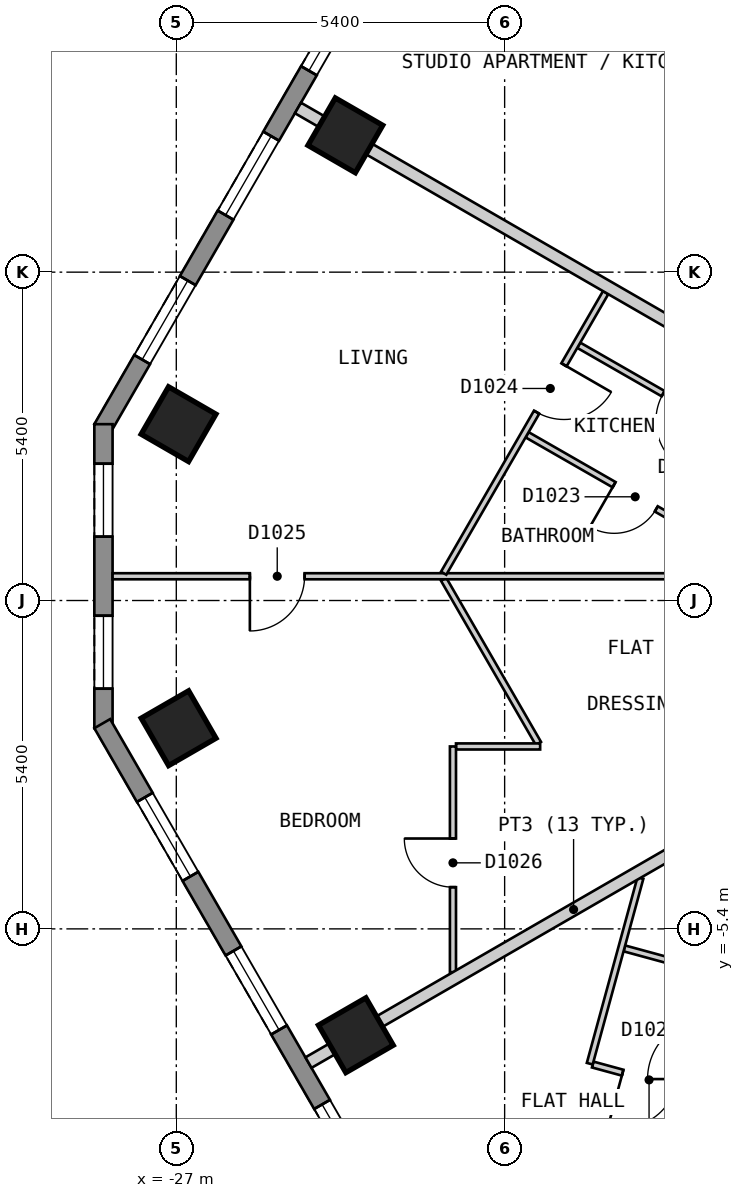
"""IFC4 building model, lengths in metres.
Left out: names, types, materials, properties, quantities, classifications, styles, units other than length and angle.
Written with IfcOpenShell. Run it as: python <this file> out.ifc"""

import sys

from ifc_helpers import new_model, si_unit, direction, frame, frame_2d, origin, origin_2d, place, context, subcontext, project, spatial, polyline, rectangle, outline, extrude, element, fill, save


model = new_model("IFC4")
c1 = context("Model", 3, precision=1e-05, world=origin(), true_north=direction((0.0, 1.0)))
c2 = subcontext(c1, "Body", "Model", "MODEL_VIEW")
j1 = project(units=[si_unit("LENGTHUNIT", "METRE"), si_unit("PLANEANGLEUNIT", "RADIAN")], contexts=[c1])
p1 = place(None, origin())
s1 = spatial("IfcSite", under=j1, at=p1, CompositionType="ELEMENT")
p2 = place(p1, origin())
s2 = spatial("IfcBuilding", under=s1, at=p2, CompositionType="ELEMENT")
p3 = place(p2, frame((0.0, 0.0, 120.6)))
s3 = spatial("IfcBuildingStorey", under=s2, at=p3, CompositionType="ELEMENT", Elevation=120.6)
for number, where, z_axis, x_axis in (
    (1, (-24.22, 7.65, 0.0), (0.0, 0.0, 1.0), (-0.5, -0.866, 0.0)),
    (2, (-26.963, 2.9, 0.0), (0.0, 0.0, 1.0), (-0.5, -0.866, 0.0)),
    (3, (-26.962, -2.1, 0.0), (0.0, 0.0, 1.0), (0.5, -0.866, 0.0)),
    (4, (-24.047, -7.149, 0.0), (0.0, 0.0, 1.0), (0.5, -0.866, 0.0)),
):
    element("IfcColumn", number, at=place(p3, frame(where, z_axis=z_axis, x_axis=x_axis)), inside=s3, PredefinedType="COLUMN", context=c2, shape_type="SweptSolid", body=[
        extrude(rectangle(XDim=0.9, YDim=0.9, at=origin_2d()), origin(), (0.0, 0.0, 1.0), 3.0),
    ])
p4 = place(p3, frame((-16.555, 23.025, 0.0), z_axis=(0.0, 0.0, 1.0), x_axis=(-0.500020536353, -0.866013546791, 0.0)))
e5 = element("IfcWall", 5, at=p4, inside=s3, PredefinedType="SOLIDWALL", context=c2, shape_type="SweptSolid", body=[
    extrude(outline(polyline([(0.0, -0.15), (23.325, -0.15), (23.245, 0.15), (0.08, 0.15), (0.0, -0.15)])), origin(), (0.0, 0.0, 1.0), 2.7),
])
p5 = place(p4, frame((1.314, 0.0, 0.15)))
e6 = element("IfcOpeningElement", 6, at=p5, cuts=e5, PredefinedType="OPENING", context=c2, shape_type="SweptSolid", body=[
    extrude(rectangle(XDim=1.5, YDim=2.1, at=frame_2d((0.75, 1.05))), frame((0.0, 0.16, 0.0), z_axis=(0.0, -1.0, 0.0), x_axis=(1.0, 0.0, 0.0)), (0.0, 0.0, 1.0), 0.32),
])
p6 = place(p4, frame((4.056, 0.0, 0.15)))
e7 = element("IfcOpeningElement", 7, at=p6, cuts=e5, PredefinedType="OPENING", context=c2, shape_type="SweptSolid", body=[
    extrude(rectangle(XDim=1.5, YDim=2.1, at=frame_2d((0.75, 1.05))), frame((0.0, 0.16, 0.0), z_axis=(0.0, -1.0, 0.0), x_axis=(1.0, 0.0, 0.0)), (0.0, 0.0, 1.0), 0.32),
])
p7 = place(p4, frame((6.799, 0.0, 0.15)))
e8 = element("IfcOpeningElement", 8, at=p7, cuts=e5, PredefinedType="OPENING", context=c2, shape_type="SweptSolid", body=[
    extrude(rectangle(XDim=1.5, YDim=2.1, at=frame_2d((0.75, 1.05))), frame((0.0, 0.16, 0.0), z_axis=(0.0, -1.0, 0.0), x_axis=(1.0, 0.0, 0.0)), (0.0, 0.0, 1.0), 0.32),
])
p8 = place(p4, frame((9.541, 0.0, 0.15)))
e9 = element("IfcOpeningElement", 9, at=p8, cuts=e5, PredefinedType="OPENING", context=c2, shape_type="SweptSolid", body=[
    extrude(rectangle(XDim=1.5, YDim=2.1, at=frame_2d((0.75, 1.05))), frame((0.0, 0.16, 0.0), z_axis=(0.0, -1.0, 0.0), x_axis=(1.0, 0.0, 0.0)), (0.0, 0.0, 1.0), 0.32),
])
p9 = place(p4, frame((12.285, 0.0, 0.15)))
e10 = element("IfcOpeningElement", 10, at=p9, cuts=e5, PredefinedType="OPENING", context=c2, shape_type="SweptSolid", body=[
    extrude(rectangle(XDim=1.5, YDim=2.1, at=frame_2d((0.75, 1.05))), frame((0.0, 0.16, 0.0), z_axis=(0.0, -1.0, 0.0), x_axis=(1.0, 0.0, 0.0)), (0.0, 0.0, 1.0), 0.32),
])
p10 = place(p4, frame((15.027, 0.0, 0.15)))
e11 = element("IfcOpeningElement", 11, at=p10, cuts=e5, PredefinedType="OPENING", context=c2, shape_type="SweptSolid", body=[
    extrude(rectangle(XDim=1.5, YDim=2.1, at=frame_2d((0.75, 1.05))), frame((0.0, 0.16, 0.0), z_axis=(0.0, -1.0, 0.0), x_axis=(1.0, 0.0, 0.0)), (0.0, 0.0, 1.0), 0.32),
])
p11 = place(p4, frame((17.769, 0.0, 0.15)))
e12 = element("IfcOpeningElement", 12, at=p11, cuts=e5, PredefinedType="OPENING", context=c2, shape_type="SweptSolid", body=[
    extrude(rectangle(XDim=1.5, YDim=2.1, at=frame_2d((0.75, 1.05))), frame((0.0, 0.16, 0.0), z_axis=(0.0, -1.0, 0.0), x_axis=(1.0, 0.0, 0.0)), (0.0, 0.0, 1.0), 0.32),
])
p12 = place(p4, frame((20.512, 0.0, 0.15)))
e13 = element("IfcOpeningElement", 13, at=p12, cuts=e5, PredefinedType="OPENING", context=c2, shape_type="SweptSolid", body=[
    extrude(rectangle(XDim=1.5, YDim=2.1, at=frame_2d((0.75, 1.05))), frame((0.0, 0.16, 0.0), z_axis=(0.0, -1.0, 0.0), x_axis=(1.0, 0.0, 0.0)), (0.0, 0.0, 1.0), 0.32),
])
p13 = place(p3, frame((-28.198, 2.9, 0.0), z_axis=(0.0, 0.0, 1.0), x_axis=(0.0, -1.0, 0.0)))
e14 = element("IfcWall", 14, at=p13, inside=s3, PredefinedType="SOLIDWALL", context=c2, shape_type="SweptSolid", body=[
    extrude(outline(polyline([(0.0, -0.15), (5.0, -0.15), (4.92, 0.15), (0.08, 0.15), (0.0, -0.15)])), origin(), (0.0, 0.0, 1.0), 2.7),
])
p14 = place(p13, frame((0.65, 0.0, 0.15)))
e15 = element("IfcOpeningElement", 15, at=p14, cuts=e14, PredefinedType="OPENING", context=c2, shape_type="SweptSolid", body=[
    extrude(rectangle(XDim=1.2, YDim=2.1, at=frame_2d((0.6, 1.05))), frame((0.0, 0.16, 0.0), z_axis=(0.0, -1.0, 0.0), x_axis=(1.0, 0.0, 0.0)), (0.0, 0.0, 1.0), 0.32),
])
p15 = place(p13, frame((3.15, 0.0, 0.15)))
e16 = element("IfcOpeningElement", 16, at=p15, cuts=e14, PredefinedType="OPENING", context=c2, shape_type="SweptSolid", body=[
    extrude(rectangle(XDim=1.2, YDim=2.1, at=frame_2d((0.6, 1.05))), frame((0.0, 0.16, 0.0), z_axis=(0.0, -1.0, 0.0), x_axis=(1.0, 0.0, 0.0)), (0.0, 0.0, 1.0), 0.32),
])
p16 = place(p3, frame((-28.218, -2.025, 0.0), z_axis=(0.0, 0.0, 1.0), x_axis=(0.500017503135, -0.866015298109, 0.0)))
e17 = element("IfcWall", 17, at=p16, inside=s3, PredefinedType="SOLIDWALL", context=c2, shape_type="SweptSolid", body=[
    extrude(outline(polyline([(0.0, -0.15), (24.711, -0.15), (24.631, 0.15), (0.08, 0.15), (0.0, -0.15)])), origin(), (0.0, 0.0, 1.0), 2.7),
])
p17 = place(p16, frame((1.4, 0.0, 0.15)))
e18 = element("IfcOpeningElement", 18, at=p17, cuts=e17, PredefinedType="OPENING", context=c2, shape_type="SweptSolid", body=[
    extrude(rectangle(XDim=1.5, YDim=2.1, at=frame_2d((0.75, 1.05))), frame((0.0, 0.16, 0.0), z_axis=(0.0, -1.0, 0.0), x_axis=(1.0, 0.0, 0.0)), (0.0, 0.0, 1.0), 0.32),
])
p18 = place(p16, frame((4.316, 0.0, 0.15)))
e19 = element("IfcOpeningElement", 19, at=p18, cuts=e17, PredefinedType="OPENING", context=c2, shape_type="SweptSolid", body=[
    extrude(rectangle(XDim=1.5, YDim=2.1, at=frame_2d((0.75, 1.05))), frame((0.0, 0.16, 0.0), z_axis=(0.0, -1.0, 0.0), x_axis=(1.0, 0.0, 0.0)), (0.0, 0.0, 1.0), 0.32),
])
p19 = place(p16, frame((7.231, 0.0, 0.15)))
e20 = element("IfcOpeningElement", 20, at=p19, cuts=e17, PredefinedType="OPENING", context=c2, shape_type="SweptSolid", body=[
    extrude(rectangle(XDim=1.5, YDim=2.1, at=frame_2d((0.75, 1.05))), frame((0.0, 0.16, 0.0), z_axis=(0.0, -1.0, 0.0), x_axis=(1.0, 0.0, 0.0)), (0.0, 0.0, 1.0), 0.32),
])
p20 = place(p16, frame((10.147, 0.0, 0.15)))
e21 = element("IfcOpeningElement", 21, at=p20, cuts=e17, PredefinedType="OPENING", context=c2, shape_type="SweptSolid", body=[
    extrude(rectangle(XDim=1.5, YDim=2.1, at=frame_2d((0.75, 1.05))), frame((0.0, 0.16, 0.0), z_axis=(0.0, -1.0, 0.0), x_axis=(1.0, 0.0, 0.0)), (0.0, 0.0, 1.0), 0.32),
])
p21 = place(p16, frame((13.062, 0.0, 0.15)))
e22 = element("IfcOpeningElement", 22, at=p21, cuts=e17, PredefinedType="OPENING", context=c2, shape_type="SweptSolid", body=[
    extrude(rectangle(XDim=1.5, YDim=2.1, at=frame_2d((0.75, 1.05))), frame((0.0, 0.16, 0.0), z_axis=(0.0, -1.0, 0.0), x_axis=(1.0, 0.0, 0.0)), (0.0, 0.0, 1.0), 0.32),
])
p22 = place(p16, frame((15.977, 0.0, 0.15)))
e23 = element("IfcOpeningElement", 23, at=p22, cuts=e17, PredefinedType="OPENING", context=c2, shape_type="SweptSolid", body=[
    extrude(rectangle(XDim=1.5, YDim=2.1, at=frame_2d((0.75, 1.05))), frame((0.0, 0.16, 0.0), z_axis=(0.0, -1.0, 0.0), x_axis=(1.0, 0.0, 0.0)), (0.0, 0.0, 1.0), 0.32),
])
p23 = place(p16, frame((18.893, 0.0, 0.15)))
e24 = element("IfcOpeningElement", 24, at=p23, cuts=e17, PredefinedType="OPENING", context=c2, shape_type="SweptSolid", body=[
    extrude(rectangle(XDim=1.5, YDim=2.1, at=frame_2d((0.75, 1.05))), frame((0.0, 0.16, 0.0), z_axis=(0.0, -1.0, 0.0), x_axis=(1.0, 0.0, 0.0)), (0.0, 0.0, 1.0), 0.32),
])
p24 = place(p16, frame((21.809, 0.0, 0.15)))
e25 = element("IfcOpeningElement", 25, at=p24, cuts=e17, PredefinedType="OPENING", context=c2, shape_type="SweptSolid", body=[
    extrude(rectangle(XDim=1.5, YDim=2.1, at=frame_2d((0.75, 1.05))), frame((0.0, 0.16, 0.0), z_axis=(0.0, -1.0, 0.0), x_axis=(1.0, 0.0, 0.0)), (0.0, 0.0, 1.0), 0.32),
])
p25 = place(p3, frame((-22.603, 0.349, 0.0), z_axis=(0.0, 0.0, 1.0), x_axis=(0.499930403552, -0.866065581584, 0.0)))
e26 = element("IfcWall", 26, at=p25, inside=s3, PredefinedType="PARTITIONING", context=c2, shape_type="SweptSolid", body=[
    extrude(rectangle(XDim=3.117, YDim=0.1, at=frame_2d((1.558, 0.0))), origin(), (0.0, 0.0, 1.0), 2.7),
])
p26 = place(p3, frame((-19.631, -5.721, 0.0), z_axis=(0.0, 0.0, 1.0), x_axis=(0.964816035809, -0.262925877475, 0.0)))
e27 = element("IfcWall", 27, at=p26, inside=s3, PredefinedType="PARTITIONING", context=c2, shape_type="SweptSolid", body=[
    extrude(rectangle(XDim=3.344, YDim=0.1, at=frame_2d((1.672, 0.0))), origin(), (0.0, 0.0, 1.0), 2.7),
])
p27 = place(p26, frame((1.047, 0.0, 0.0)))
e28 = element("IfcOpeningElement", 28, at=p27, cuts=e27, PredefinedType="OPENING", context=c2, shape_type="SweptSolid", body=[
    extrude(rectangle(XDim=0.8, YDim=2.1, at=frame_2d((0.4, 1.05))), frame((0.0, 0.06, 0.0), z_axis=(0.0, -1.0, 0.0), x_axis=(1.0, 0.0, 0.0)), (0.0, 0.0, 1.0), 0.12),
])
p28 = place(p3, frame((-20.151, -7.631, 0.0), z_axis=(0.0, 0.0, 1.0), x_axis=(0.964784947449, -0.263039930765, 0.0)))
e29 = element("IfcWall", 29, at=p28, inside=s3, PredefinedType="PARTITIONING", context=c2, shape_type="SweptSolid", body=[
    extrude(rectangle(XDim=1.866, YDim=0.1, at=frame_2d((0.933, 0.0))), origin(), (0.0, 0.0, 1.0), 2.7),
])
p29 = place(p28, frame((0.51, 0.0, 0.0)))
e30 = element("IfcOpeningElement", 30, at=p29, cuts=e29, PredefinedType="OPENING", context=c2, shape_type="SweptSolid", body=[
    extrude(rectangle(XDim=0.9, YDim=2.1, at=frame_2d((0.45, 1.05))), frame((0.0, 0.06, 0.0), z_axis=(0.0, -1.0, 0.0), x_axis=(1.0, 0.0, 0.0)), (0.0, 0.0, 1.0), 0.12),
])
p30 = place(p3, frame((-20.381, 4.198, 0.0), z_axis=(0.0, 0.0, 1.0), x_axis=(0.867459321792, -0.497508115549, 0.0)))
e31 = element("IfcWall", 31, at=p30, inside=s3, PredefinedType="PARTITIONING", context=c2, shape_type="SweptSolid", body=[
    extrude(rectangle(XDim=4.05, YDim=0.1, at=frame_2d((2.025, 0.0))), origin(), (0.0, 0.0, 1.0), 2.7),
])
p31 = place(p30, frame((1.6, 0.0, 0.0)))
e32 = element("IfcOpeningElement", 32, at=p31, cuts=e31, PredefinedType="OPENING", context=c2, shape_type="SweptSolid", body=[
    extrude(rectangle(XDim=0.9, YDim=2.1, at=frame_2d((0.45, 1.05))), frame((0.0, 0.06, 0.0), z_axis=(0.0, -1.0, 0.0), x_axis=(1.0, 0.0, 0.0)), (0.0, 0.0, 1.0), 0.12),
])
p32 = place(p3, frame((-21.231, 2.726, 0.0), z_axis=(0.0, 0.0, 1.0), x_axis=(0.867314299312, -0.497760892607, 0.0)))
e33 = element("IfcWall", 33, at=p32, inside=s3, PredefinedType="PARTITIONING", context=c2, shape_type="SweptSolid", body=[
    extrude(rectangle(XDim=4.05, YDim=0.1, at=frame_2d((2.025, 0.0))), origin(), (0.0, 0.0, 1.0), 2.7),
])
p33 = place(p32, frame((1.65, 0.0, 0.0)))
e34 = element("IfcOpeningElement", 34, at=p33, cuts=e33, PredefinedType="OPENING", context=c2, shape_type="SweptSolid", body=[
    extrude(rectangle(XDim=0.8, YDim=2.1, at=frame_2d((0.4, 1.05))), frame((0.0, 0.06, 0.0), z_axis=(0.0, -1.0, 0.0), x_axis=(1.0, 0.0, 0.0)), (0.0, 0.0, 1.0), 0.12),
])
p34 = place(p3, frame((-22.4, -2.4, 0.0), z_axis=(0.0, 0.0, 1.0), x_axis=(1.0, 0.0, 0.0)))
e35 = element("IfcWall", 35, at=p34, inside=s3, PredefinedType="PARTITIONING", context=c2, shape_type="SweptSolid", body=[
    extrude(rectangle(XDim=1.384, YDim=0.1, at=frame_2d((0.692, 0.0))), origin(), (0.0, 0.0, 1.0), 2.7),
])
p35 = place(p3, frame((-28.048, 0.399, 0.0), z_axis=(0.0, 0.0, 1.0), x_axis=(1.0, 0.0, 0.0)))
e36 = element("IfcWall", 36, at=p35, inside=s3, PredefinedType="PARTITIONING", context=c2, shape_type="SweptSolid", body=[
    extrude(rectangle(XDim=10.266, YDim=0.1, at=frame_2d((5.133, 0.0))), origin(), (0.0, 0.0, 1.0), 2.7),
])
p36 = place(p35, frame((2.258, 0.0, 0.0)))
e37 = element("IfcOpeningElement", 37, at=p36, cuts=e36, PredefinedType="OPENING", context=c2, shape_type="SweptSolid", body=[
    extrude(rectangle(XDim=0.9, YDim=2.1, at=frame_2d((0.45, 1.05))), frame((0.0, 0.06, 0.0), z_axis=(0.0, -1.0, 0.0), x_axis=(1.0, 0.0, 0.0)), (0.0, 0.0, 1.0), 0.12),
])
p37 = place(p3, frame((-22.603, 0.449, 0.0), z_axis=(0.0, 0.0, 1.0), x_axis=(0.500022588228, 0.866012362072, 0.0)))
e38 = element("IfcWall", 38, at=p37, inside=s3, PredefinedType="PARTITIONING", context=c2, shape_type="SweptSolid", body=[
    extrude(rectangle(XDim=5.328, YDim=0.1, at=frame_2d((2.664, 0.0))), origin(), (0.0, 0.0, 1.0), 2.7),
])
p38 = place(p37, frame((3.058, 0.0, 0.0)))
e39 = element("IfcOpeningElement", 39, at=p38, cuts=e38, PredefinedType="OPENING", context=c2, shape_type="SweptSolid", body=[
    extrude(rectangle(XDim=0.9, YDim=2.1, at=frame_2d((0.45, 1.05))), frame((0.0, 0.06, 0.0), z_axis=(0.0, -1.0, 0.0), x_axis=(1.0, 0.0, 0.0)), (0.0, 0.0, 1.0), 0.12),
])
p39 = place(p3, frame((-20.2, -7.617, 0.0), z_axis=(0.0, 0.0, 1.0), x_axis=(0.263150035392, 0.964754921663, 0.0)))
e40 = element("IfcWall", 40, at=p39, inside=s3, PredefinedType="PARTITIONING", context=c2, shape_type="SweptSolid", body=[
    extrude(rectangle(XDim=3.166, YDim=0.1, at=frame_2d((1.583, 0.0))), origin(), (0.0, 0.0, 1.0), 2.7),
])
p40 = place(p3, frame((-22.45, -6.112, 0.0), z_axis=(0.0, 0.0, 1.0), x_axis=(0.0, 1.0, 0.0)))
e41 = element("IfcWall", 41, at=p40, inside=s3, PredefinedType="PARTITIONING", context=c2, shape_type="SweptSolid", body=[
    extrude(rectangle(XDim=3.712, YDim=0.1, at=frame_2d((1.856, 0.0))), origin(), (0.0, 0.0, 1.0), 2.7),
])
p41 = place(p40, frame((1.398, 0.0, 0.0)))
e42 = element("IfcOpeningElement", 42, at=p41, cuts=e41, PredefinedType="OPENING", context=c2, shape_type="SweptSolid", body=[
    extrude(rectangle(XDim=0.8, YDim=2.1, at=frame_2d((0.4, 1.05))), frame((0.0, 0.06, 0.0), z_axis=(0.0, -1.0, 0.0), x_axis=(1.0, 0.0, 0.0)), (0.0, 0.0, 1.0), 0.12),
])
p42 = place(p3, frame((-24.999, 8.1, 0.0), z_axis=(0.0, 0.0, 1.0), x_axis=(0.866016855193, -0.500014806302, 0.0)))
e43 = element("IfcWall", 43, at=p42, inside=s3, PredefinedType="PARTITIONING", context=c2, shape_type="SweptSolid", body=[
    extrude(rectangle(XDim=10.0, YDim=0.2, at=frame_2d((5.0, 0.0))), origin(), (0.0, 0.0, 1.0), 2.7),
])
p43 = place(p3, frame((-22.257, 12.85, 0.0), z_axis=(0.0, 0.0, 1.0), x_axis=(0.866047370643, -0.499961950354, 0.0)))
e44 = element("IfcWall", 44, at=p43, inside=s3, PredefinedType="PARTITIONING", context=c2, shape_type="SweptSolid", body=[
    extrude(rectangle(XDim=10.001, YDim=0.2, at=frame_2d((5.0, 0.0))), origin(), (0.0, 0.0, 1.0), 2.7),
])
p44 = place(p3, frame((-24.826, -7.599, 0.0), z_axis=(0.0, 0.0, 1.0), x_axis=(0.86599621094, 0.500050560081, 0.0)))
e45 = element("IfcWall", 45, at=p44, inside=s3, PredefinedType="PARTITIONING", context=c2, shape_type="SweptSolid", body=[
    extrude(rectangle(XDim=10.069, YDim=0.2, at=frame_2d((5.035, 0.0))), origin(), (0.0, 0.0, 1.0), 2.7),
])
p45 = place(p10, origin())
e46 = element("IfcWindow", 46, at=p45, inside=s3, PartitioningType="SINGLE_PANEL", PredefinedType="WINDOW", context=c2, shape_type="SweptSolid", body=[
    extrude(rectangle(XDim=1.5, YDim=2.1, at=frame_2d((0.75, 1.05))), frame((0.0, 0.03, 0.0), z_axis=(0.0, -1.0, 0.0), x_axis=(1.0, 0.0, 0.0)), (0.0, 0.0, 1.0), 0.06),
])
fill(e11, e46)
p46 = place(p11, origin())
e47 = element("IfcWindow", 47, at=p46, inside=s3, PartitioningType="SINGLE_PANEL", PredefinedType="WINDOW", context=c2, shape_type="SweptSolid", body=[
    extrude(rectangle(XDim=1.5, YDim=2.1, at=frame_2d((0.75, 1.05))), frame((0.0, 0.03, 0.0), z_axis=(0.0, -1.0, 0.0), x_axis=(1.0, 0.0, 0.0)), (0.0, 0.0, 1.0), 0.06),
])
fill(e12, e47)
p47 = place(p12, origin())
e48 = element("IfcWindow", 48, at=p47, inside=s3, PartitioningType="SINGLE_PANEL", PredefinedType="WINDOW", context=c2, shape_type="SweptSolid", body=[
    extrude(rectangle(XDim=1.5, YDim=2.1, at=frame_2d((0.75, 1.05))), frame((0.0, 0.03, 0.0), z_axis=(0.0, -1.0, 0.0), x_axis=(1.0, 0.0, 0.0)), (0.0, 0.0, 1.0), 0.06),
])
fill(e13, e48)
p48 = place(p14, origin())
e49 = element("IfcWindow", 49, at=p48, inside=s3, PartitioningType="SINGLE_PANEL", PredefinedType="WINDOW", context=c2, shape_type="SweptSolid", body=[
    extrude(rectangle(XDim=1.2, YDim=2.1, at=frame_2d((0.6, 1.05))), frame((0.0, 0.03, 0.0), z_axis=(0.0, -1.0, 0.0), x_axis=(1.0, 0.0, 0.0)), (0.0, 0.0, 1.0), 0.06),
])
fill(e15, e49)
p49 = place(p15, origin())
e50 = element("IfcWindow", 50, at=p49, inside=s3, PartitioningType="SINGLE_PANEL", PredefinedType="WINDOW", context=c2, shape_type="SweptSolid", body=[
    extrude(rectangle(XDim=1.2, YDim=2.1, at=frame_2d((0.6, 1.05))), frame((0.0, 0.03, 0.0), z_axis=(0.0, -1.0, 0.0), x_axis=(1.0, 0.0, 0.0)), (0.0, 0.0, 1.0), 0.06),
])
fill(e16, e50)
p50 = place(p17, origin())
e51 = element("IfcWindow", 51, at=p50, inside=s3, PartitioningType="SINGLE_PANEL", PredefinedType="WINDOW", context=c2, shape_type="SweptSolid", body=[
    extrude(rectangle(XDim=1.5, YDim=2.1, at=frame_2d((0.75, 1.05))), frame((0.0, 0.03, 0.0), z_axis=(0.0, -1.0, 0.0), x_axis=(1.0, 0.0, 0.0)), (0.0, 0.0, 1.0), 0.06),
])
fill(e18, e51)
p51 = place(p18, origin())
e52 = element("IfcWindow", 52, at=p51, inside=s3, PartitioningType="SINGLE_PANEL", PredefinedType="WINDOW", context=c2, shape_type="SweptSolid", body=[
    extrude(rectangle(XDim=1.5, YDim=2.1, at=frame_2d((0.75, 1.05))), frame((0.0, 0.03, 0.0), z_axis=(0.0, -1.0, 0.0), x_axis=(1.0, 0.0, 0.0)), (0.0, 0.0, 1.0), 0.06),
])
fill(e19, e52)
p52 = place(p19, origin())
e53 = element("IfcWindow", 53, at=p52, inside=s3, PartitioningType="SINGLE_PANEL", PredefinedType="WINDOW", context=c2, shape_type="SweptSolid", body=[
    extrude(rectangle(XDim=1.5, YDim=2.1, at=frame_2d((0.75, 1.05))), frame((0.0, 0.03, 0.0), z_axis=(0.0, -1.0, 0.0), x_axis=(1.0, 0.0, 0.0)), (0.0, 0.0, 1.0), 0.06),
])
fill(e20, e53)
p53 = place(p31, origin())
e54 = element("IfcDoor", 54, at=p53, inside=s3, OperationType="SINGLE_SWING_RIGHT", PredefinedType="DOOR", context=c2, shape_type="SweptSolid", body=[
    extrude(rectangle(XDim=0.9, YDim=2.1, at=frame_2d((0.45, 1.05))), frame((0.0, 0.025, 0.0), z_axis=(0.0, -1.0, 0.0), x_axis=(1.0, 0.0, 0.0)), (0.0, 0.0, 1.0), 0.05),
])
fill(e32, e54)
p54 = place(p33, origin())
e55 = element("IfcDoor", 55, at=p54, inside=s3, OperationType="SINGLE_SWING_LEFT", PredefinedType="DOOR", context=c2, shape_type="SweptSolid", body=[
    extrude(rectangle(XDim=0.8, YDim=2.1, at=frame_2d((0.4, 1.05))), frame((0.0, 0.025, 0.0), z_axis=(0.0, -1.0, 0.0), x_axis=(1.0, 0.0, 0.0)), (0.0, 0.0, 1.0), 0.05),
])
fill(e34, e55)
p55 = place(p38, origin())
e56 = element("IfcDoor", 56, at=p55, inside=s3, OperationType="SINGLE_SWING_RIGHT", PredefinedType="DOOR", context=c2, shape_type="SweptSolid", body=[
    extrude(rectangle(XDim=0.9, YDim=2.1, at=frame_2d((0.45, 1.05))), frame((0.0, 0.025, 0.0), z_axis=(0.0, -1.0, 0.0), x_axis=(1.0, 0.0, 0.0)), (0.0, 0.0, 1.0), 0.05),
])
fill(e39, e56)
p56 = place(p36, origin())
e57 = element("IfcDoor", 57, at=p56, inside=s3, OperationType="SINGLE_SWING_LEFT", PredefinedType="DOOR", context=c2, shape_type="SweptSolid", body=[
    extrude(rectangle(XDim=0.9, YDim=2.1, at=frame_2d((0.45, 1.05))), frame((0.0, 0.025, 0.0), z_axis=(0.0, -1.0, 0.0), x_axis=(1.0, 0.0, 0.0)), (0.0, 0.0, 1.0), 0.05),
])
fill(e37, e57)
p57 = place(p41, origin())
e58 = element("IfcDoor", 58, at=p57, inside=s3, OperationType="SINGLE_SWING_RIGHT", PredefinedType="DOOR", context=c2, shape_type="SweptSolid", body=[
    extrude(rectangle(XDim=0.8, YDim=2.1, at=frame_2d((0.4, 1.05))), frame((0.0, 0.025, 0.0), z_axis=(0.0, -1.0, 0.0), x_axis=(1.0, 0.0, 0.0)), (0.0, 0.0, 1.0), 0.05),
])
fill(e42, e58)
p58 = place(p29, origin())
e59 = element("IfcDoor", 59, at=p58, inside=s3, OperationType="SINGLE_SWING_LEFT", PredefinedType="DOOR", context=c2, shape_type="SweptSolid", body=[
    extrude(rectangle(XDim=0.9, YDim=2.1, at=frame_2d((0.45, 1.05))), frame((0.0, 0.025, 0.0), z_axis=(0.0, -1.0, 0.0), x_axis=(1.0, 0.0, 0.0)), (0.0, 0.0, 1.0), 0.05),
])
fill(e30, e59)
save(model, sys.argv[1])
